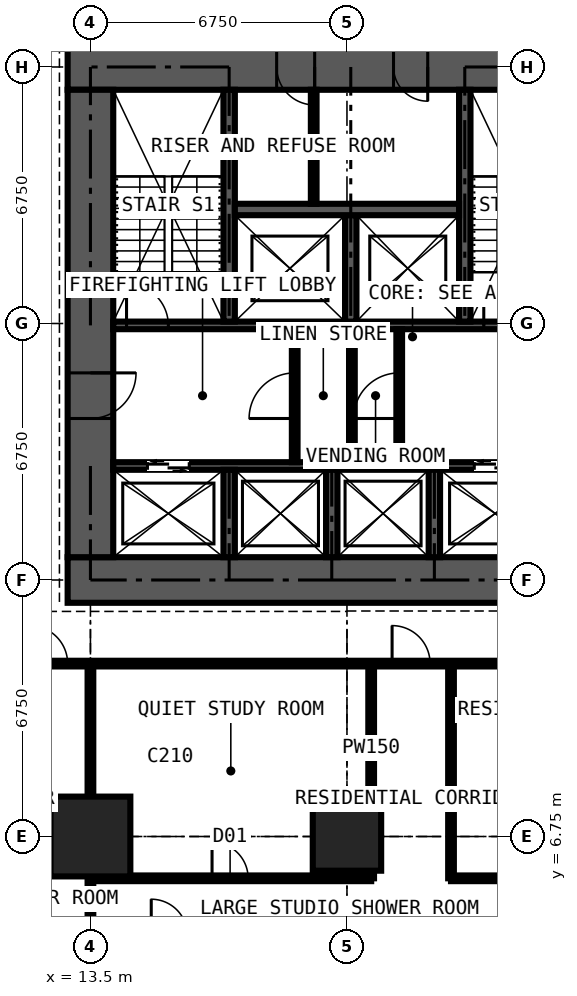
"""IFC4 building model, lengths in metres.
Left out: names, types, materials, properties, quantities, classifications, styles, units other than length and angle.
Written with IfcOpenShell. Run it as: python <this file> out.ifc"""

import sys

from ifc_helpers import new_model, si_unit, direction, frame, frame_2d, origin, origin_2d, place, context, subcontext, project, spatial, rectangle, extrude, element, fill, save


model = new_model("IFC4")
c1 = context("Model", 3, precision=1e-05, world=origin(), true_north=direction((0.0, 1.0)))
c2 = subcontext(c1, "Body", "Model", "MODEL_VIEW")
j1 = project(units=[si_unit("LENGTHUNIT", "METRE"), si_unit("PLANEANGLEUNIT", "RADIAN")], contexts=[c1])
p1 = place(None, origin())
s1 = spatial("IfcSite", under=j1, at=p1, CompositionType="ELEMENT")
p2 = place(p1, origin())
s2 = spatial("IfcBuilding", under=s1, at=p2, CompositionType="ELEMENT")
p3 = place(p2, frame((0.0, 0.0, 72.0)))
s3 = spatial("IfcBuildingStorey", under=s2, at=p3, CompositionType="ELEMENT", Elevation=72.0)
p4 = place(p3, frame((13.5, 6.75, 0.0), z_axis=(0.0, 0.0, 1.0), x_axis=(1.0, 0.0, 0.0)))
e1 = element("IfcColumn", 1, at=p4, inside=s3, PredefinedType="COLUMN", context=c2, shape_type="SweptSolid", body=[
    extrude(rectangle(XDim=2.1, YDim=2.1, at=origin_2d()), origin(), (0.0, 0.0, 1.0), 3.6),
])
p5 = place(p3, frame((20.25, 6.75, 0.0), z_axis=(0.0, 0.0, 1.0), x_axis=(1.0, 0.0, 0.0)))
e2 = element("IfcColumn", 2, at=p5, inside=s3, PredefinedType="COLUMN", context=c2, shape_type="SweptSolid", body=[
    extrude(rectangle(XDim=1.8, YDim=1.8, at=origin_2d()), origin(), (0.0, 0.0, 1.0), 3.6),
])
p6 = place(p3, frame((12.9, 13.5, 0.0), z_axis=(0.0, 0.0, 1.0), x_axis=(1.0, 0.0, 0.0)))
e3 = element("IfcWall", 3, at=p6, inside=s3, PredefinedType="SHEAR", context=c2, shape_type="SweptSolid", body=[
    extrude(rectangle(XDim=14.7, YDim=1.2, at=frame_2d((7.35, 0.0))), origin(), (0.0, 0.0, 1.0), 3.6),
])
p7 = place(p3, frame((27.6, 27.0, 0.0), z_axis=(0.0, 0.0, 1.0), x_axis=(-1.0, 0.0, 0.0)))
e4 = element("IfcWall", 4, at=p7, inside=s3, PredefinedType="SHEAR", context=c2, shape_type="SweptSolid", body=[
    extrude(rectangle(XDim=14.7, YDim=1.2, at=frame_2d((7.35, 0.0))), origin(), (0.0, 0.0, 1.0), 3.6),
])
p8 = place(p7, frame((5.225, 0.0, 0.0)))
e5 = element("IfcOpeningElement", 5, at=p8, cuts=e4, PredefinedType="OPENING", context=c2, shape_type="SweptSolid", body=[
    extrude(rectangle(XDim=0.9, YDim=2.2, at=frame_2d((0.45, 1.1))), frame((0.0, 0.61, 0.0), z_axis=(0.0, -1.0, 0.0), x_axis=(1.0, 0.0, 0.0)), (0.0, 0.0, 1.0), 1.22),
])
p9 = place(p7, frame((8.2, 0.0, 0.0)))
e6 = element("IfcOpeningElement", 6, at=p9, cuts=e4, PredefinedType="OPENING", context=c2, shape_type="SweptSolid", body=[
    extrude(rectangle(XDim=1.0, YDim=2.2, at=frame_2d((0.5, 1.1))), frame((0.0, 0.61, 0.0), z_axis=(0.0, -1.0, 0.0), x_axis=(1.0, 0.0, 0.0)), (0.0, 0.0, 1.0), 1.22),
])
p10 = place(p3, frame((13.5, 26.4, 0.0), z_axis=(0.0, 0.0, 1.0), x_axis=(0.0, -1.0, 0.0)))
e7 = element("IfcWall", 7, at=p10, inside=s3, PredefinedType="SHEAR", context=c2, shape_type="SweptSolid", body=[
    extrude(rectangle(XDim=12.3, YDim=1.2, at=frame_2d((6.15, 0.0))), origin(), (0.0, 0.0, 1.0), 3.6),
])
p11 = place(p10, frame((7.45, 0.0, 0.0)))
e8 = element("IfcOpeningElement", 8, at=p11, cuts=e7, PredefinedType="OPENING", context=c2, shape_type="SweptSolid", body=[
    extrude(rectangle(XDim=1.2, YDim=2.2, at=frame_2d((0.6, 1.1))), frame((0.0, 0.61, 0.0), z_axis=(0.0, -1.0, 0.0), x_axis=(1.0, 0.0, 0.0)), (0.0, 0.0, 1.0), 1.22),
])
p12 = place(p3, frame((14.1, 16.5, 0.0), z_axis=(0.0, 0.0, 1.0), x_axis=(1.0, 0.0, 0.0)))
e9 = element("IfcWall", 9, at=p12, inside=s3, PredefinedType="SHEAR", context=c2, shape_type="SweptSolid", body=[
    extrude(rectangle(XDim=12.3, YDim=0.2, at=frame_2d((6.15, 0.0))), origin(), (0.0, 0.0, 1.0), 3.6),
])
p13 = place(p12, frame((0.9, 0.0, 0.0)))
e10 = element("IfcOpeningElement", 10, at=p13, cuts=e9, PredefinedType="OPENING", context=c2, shape_type="SweptSolid", body=[
    extrude(rectangle(XDim=1.1, YDim=2.2, at=frame_2d((0.55, 1.1))), frame((0.0, 0.11, 0.0), z_axis=(0.0, -1.0, 0.0), x_axis=(1.0, 0.0, 0.0)), (0.0, 0.0, 1.0), 0.22),
])
p14 = place(p12, frame((9.5, 0.0, 0.0)))
e11 = element("IfcOpeningElement", 11, at=p14, cuts=e9, PredefinedType="OPENING", context=c2, shape_type="SweptSolid", body=[
    extrude(rectangle(XDim=1.1, YDim=2.2, at=frame_2d((0.55, 1.1))), frame((0.0, 0.11, 0.0), z_axis=(0.0, -1.0, 0.0), x_axis=(1.0, 0.0, 0.0)), (0.0, 0.0, 1.0), 0.22),
])
p15 = place(p3, frame((14.1, 20.2, 0.0), z_axis=(0.0, 0.0, 1.0), x_axis=(1.0, 0.0, 0.0)))
e12 = element("IfcWall", 12, at=p15, inside=s3, PredefinedType="SHEAR", context=c2, shape_type="SweptSolid", body=[
    extrude(rectangle(XDim=12.3, YDim=0.2, at=frame_2d((6.15, 0.0))), origin(), (0.0, 0.0, 1.0), 3.6),
])
p16 = place(p15, frame((0.35, 0.0, 0.0)))
e13 = element("IfcOpeningElement", 13, at=p16, cuts=e12, PredefinedType="OPENING", context=c2, shape_type="SweptSolid", body=[
    extrude(rectangle(XDim=1.1, YDim=2.2, at=frame_2d((0.55, 1.1))), frame((0.0, 0.11, 0.0), z_axis=(0.0, -1.0, 0.0), x_axis=(1.0, 0.0, 0.0)), (0.0, 0.0, 1.0), 0.22),
])
p17 = place(p15, frame((9.75, 0.0, 0.0)))
e14 = element("IfcOpeningElement", 14, at=p17, cuts=e12, PredefinedType="OPENING", context=c2, shape_type="SweptSolid", body=[
    extrude(rectangle(XDim=1.1, YDim=2.2, at=frame_2d((0.55, 1.1))), frame((0.0, 0.11, 0.0), z_axis=(0.0, -1.0, 0.0), x_axis=(1.0, 0.0, 0.0)), (0.0, 0.0, 1.0), 0.22),
])
for number, where, z_axis, x_axis in (
    (15, (17.15, 20.3, 0.0), (0.0, 0.0, 1.0), (0.0, 1.0, 0.0)),
    (16, (23.35, 20.3, 0.0), (0.0, 0.0, 1.0), (0.0, 1.0, 0.0)),
):
    element("IfcWall", number, at=place(p3, frame(where, z_axis=z_axis, x_axis=x_axis)), inside=s3, PredefinedType="SHEAR", context=c2, shape_type="SweptSolid", body=[
        extrude(rectangle(XDim=6.1, YDim=0.3, at=frame_2d((3.05, 0.0))), origin(), (0.0, 0.0, 1.0), 3.6),
    ])
p18 = place(p3, frame((20.35, 20.3, 0.0), z_axis=(0.0, 0.0, 1.0), x_axis=(0.0, 1.0, 0.0)))
e17 = element("IfcWall", 17, at=p18, inside=s3, PredefinedType="SHEAR", context=c2, shape_type="SweptSolid", body=[
    extrude(rectangle(XDim=2.8, YDim=0.3, at=frame_2d((1.4, 0.0))), origin(), (0.0, 0.0, 1.0), 3.6),
])
p19 = place(p3, frame((17.3, 23.25, 0.0), z_axis=(0.0, 0.0, 1.0), x_axis=(1.0, 0.0, 0.0)))
e18 = element("IfcWall", 18, at=p19, inside=s3, PredefinedType="SHEAR", context=c2, shape_type="SweptSolid", body=[
    extrude(rectangle(XDim=5.9, YDim=0.3, at=frame_2d((2.95, 0.0))), origin(), (0.0, 0.0, 1.0), 3.6),
])
for number, where, z_axis, x_axis in (
    (19, (17.15, 14.1, 0.0), (0.0, 0.0, 1.0), (0.0, 1.0, 0.0)),
    (20, (19.85, 14.1, 0.0), (0.0, 0.0, 1.0), (0.0, 1.0, 0.0)),
    (21, (22.55, 14.1, 0.0), (0.0, 0.0, 1.0), (0.0, 1.0, 0.0)),
):
    element("IfcWall", number, at=place(p3, frame(where, z_axis=z_axis, x_axis=x_axis)), inside=s3, PredefinedType="SHEAR", context=c2, shape_type="SweptSolid", body=[
        extrude(rectangle(XDim=2.3, YDim=0.3, at=frame_2d((1.15, 0.0))), origin(), (0.0, 0.0, 1.0), 3.6),
    ])
p20 = place(p3, frame((18.875, 16.6, 0.0), z_axis=(0.0, 0.0, 1.0), x_axis=(0.0, 1.0, 0.0)))
e22 = element("IfcWall", 22, at=p20, inside=s3, PredefinedType="PARTITIONING", context=c2, shape_type="SweptSolid", body=[
    extrude(rectangle(XDim=3.5, YDim=0.15, at=frame_2d((1.75, 0.0))), origin(), (0.0, 0.0, 1.0), 3.3),
])
p21 = place(p20, frame((1.15, 0.0, 0.0)))
e23 = element("IfcOpeningElement", 23, at=p21, cuts=e22, PredefinedType="OPENING", context=c2, shape_type="SweptSolid", body=[
    extrude(rectangle(XDim=1.2, YDim=2.2, at=frame_2d((0.6, 1.1))), frame((0.0, 0.085, 0.0), z_axis=(0.0, -1.0, 0.0), x_axis=(1.0, 0.0, 0.0)), (0.0, 0.0, 1.0), 0.17),
])
p22 = place(p3, frame((21.625, 16.6, 0.0), z_axis=(0.0, 0.0, 1.0), x_axis=(0.0, 1.0, 0.0)))
e24 = element("IfcWall", 24, at=p22, inside=s3, PredefinedType="PARTITIONING", context=c2, shape_type="SweptSolid", body=[
    extrude(rectangle(XDim=3.5, YDim=0.15, at=frame_2d((1.75, 0.0))), origin(), (0.0, 0.0, 1.0), 3.3),
])
p23 = place(p22, frame((1.15, 0.0, 0.0)))
e25 = element("IfcOpeningElement", 25, at=p23, cuts=e24, PredefinedType="OPENING", context=c2, shape_type="SweptSolid", body=[
    extrude(rectangle(XDim=1.2, YDim=2.2, at=frame_2d((0.6, 1.1))), frame((0.0, 0.085, 0.0), z_axis=(0.0, -1.0, 0.0), x_axis=(1.0, 0.0, 0.0)), (0.0, 0.0, 1.0), 0.17),
])
p24 = place(p3, frame((20.38, 16.6, 0.0), z_axis=(0.0, 0.0, 1.0), x_axis=(0.0, 1.0, 0.0)))
e26 = element("IfcWall", 26, at=p24, inside=s3, PredefinedType="PARTITIONING", context=c2, shape_type="SweptSolid", body=[
    extrude(rectangle(XDim=3.5, YDim=0.15, at=frame_2d((1.75, 0.0))), origin(), (0.0, 0.0, 1.0), 3.3),
])
p25 = place(p3, frame((19.375, 23.4, 0.0), z_axis=(0.0, 0.0, 1.0), x_axis=(0.0, 1.0, 0.0)))
e27 = element("IfcWall", 27, at=p25, inside=s3, PredefinedType="PARTITIONING", context=c2, shape_type="SweptSolid", body=[
    extrude(rectangle(XDim=3.0, YDim=0.15, at=frame_2d((1.5, 0.0))), origin(), (0.0, 0.0, 1.0), 3.3),
])
p26 = place(p3, frame((10.125, 11.3, 0.0), z_axis=(0.0, 0.0, 1.0), x_axis=(1.0, 0.0, 0.0)))
e28 = element("IfcWall", 28, at=p26, inside=s3, PredefinedType="PARTITIONING", context=c2, shape_type="SweptSolid", body=[
    extrude(rectangle(XDim=20.675, YDim=0.15, at=frame_2d((10.337, 0.0))), origin(), (0.0, 0.0, 1.0), 3.3),
])
p27 = place(p26, frame((1.775, 0.0, 0.0)))
e29 = element("IfcOpeningElement", 29, at=p27, cuts=e28, PredefinedType="OPENING", context=c2, shape_type="SweptSolid", body=[
    extrude(rectangle(XDim=1.0, YDim=2.2, at=frame_2d((0.5, 1.1))), frame((0.0, 0.085, 0.0), z_axis=(0.0, -1.0, 0.0), x_axis=(1.0, 0.0, 0.0)), (0.0, 0.0, 1.0), 0.17),
])
p28 = place(p26, frame((11.312, 0.0, 0.0)))
e30 = element("IfcOpeningElement", 30, at=p28, cuts=e28, PredefinedType="OPENING", context=c2, shape_type="SweptSolid", body=[
    extrude(rectangle(XDim=1.0, YDim=2.2, at=frame_2d((0.5, 1.1))), frame((0.0, 0.085, 0.0), z_axis=(0.0, -1.0, 0.0), x_axis=(1.0, 0.0, 0.0)), (0.0, 0.0, 1.0), 0.17),
])
p29 = place(p3, frame((13.5, -0.734, 0.0), z_axis=(0.0, 0.0, 1.0), x_axis=(0.0, 1.0, 0.0)))
e31 = element("IfcWall", 31, at=p29, inside=s3, PredefinedType="PARTITIONING", context=c2, shape_type="SweptSolid", body=[
    extrude(rectangle(XDim=12.034, YDim=0.15, at=frame_2d((6.017, 0.0))), origin(), (0.0, 0.0, 1.0), 2.802),
])
p30 = place(p3, frame((13.5, 5.65, 0.0), z_axis=(0.0, 0.0, 1.0), x_axis=(1.0, 0.0, 0.0)))
e32 = element("IfcWall", 32, at=p30, inside=s3, PredefinedType="PARTITIONING", context=c2, shape_type="SweptSolid", body=[
    extrude(rectangle(XDim=7.387, YDim=0.15, at=frame_2d((3.694, 0.0))), origin(), (0.0, 0.0, 1.0), 3.3),
])
p31 = place(p30, frame((3.2, 0.0, 0.0)))
e33 = element("IfcOpeningElement", 33, at=p31, cuts=e32, PredefinedType="OPENING", context=c2, shape_type="SweptSolid", body=[
    extrude(rectangle(XDim=0.95, YDim=2.2, at=frame_2d((0.475, 1.1))), frame((0.0, 0.085, 0.0), z_axis=(0.0, -1.0, 0.0), x_axis=(1.0, 0.0, 0.0)), (0.0, 0.0, 1.0), 0.17),
])
p32 = place(p3, frame((20.887, 5.65, 0.0), z_axis=(0.0, 0.0, 1.0), x_axis=(0.0, 1.0, 0.0)))
e34 = element("IfcWall", 34, at=p32, inside=s3, PredefinedType="PARTITIONING", context=c2, shape_type="SweptSolid", body=[
    extrude(rectangle(XDim=5.65, YDim=0.15, at=frame_2d((2.825, 0.0))), origin(), (0.0, 0.0, 1.0), 3.3),
])
p33 = place(p3, frame((22.988, 5.65, 0.0), z_axis=(0.0, 0.0, 1.0), x_axis=(1.0, 0.0, 0.0)))
e35 = element("IfcWall", 35, at=p33, inside=s3, PredefinedType="PARTITIONING", context=c2, shape_type="SweptSolid", body=[
    extrude(rectangle(XDim=7.387, YDim=0.15, at=frame_2d((3.694, 0.0))), origin(), (0.0, 0.0, 1.0), 3.3),
])
p34 = place(p33, frame((2.0, 0.0, 0.0)))
e36 = element("IfcOpeningElement", 36, at=p34, cuts=e35, PredefinedType="OPENING", context=c2, shape_type="SweptSolid", body=[
    extrude(rectangle(XDim=0.95, YDim=2.2, at=frame_2d((0.475, 1.1))), frame((0.0, 0.085, 0.0), z_axis=(0.0, -1.0, 0.0), x_axis=(1.0, 0.0, 0.0)), (0.0, 0.0, 1.0), 0.17),
])
p35 = place(p3, frame((22.988, 5.65, 0.0), z_axis=(0.0, 0.0, 1.0), x_axis=(0.0, 1.0, 0.0)))
e37 = element("IfcWall", 37, at=p35, inside=s3, PredefinedType="PARTITIONING", context=c2, shape_type="SweptSolid", body=[
    extrude(rectangle(XDim=5.65, YDim=0.15, at=frame_2d((2.825, 0.0))), origin(), (0.0, 0.0, 1.0), 3.3),
])
p36 = place(p13, origin())
e38 = element("IfcDoor", 38, at=p36, inside=s3, OperationType="DOUBLE_DOOR_SLIDING", PredefinedType="DOOR", context=c2, shape_type="SweptSolid", body=[
    extrude(rectangle(XDim=1.1, YDim=2.2, at=frame_2d((0.55, 1.1))), frame((0.0, 0.025, 0.0), z_axis=(0.0, -1.0, 0.0), x_axis=(1.0, 0.0, 0.0)), (0.0, 0.0, 1.0), 0.05),
])
fill(e10, e38)
p37 = place(p14, origin())
e39 = element("IfcDoor", 39, at=p37, inside=s3, OperationType="DOUBLE_DOOR_SLIDING", PredefinedType="DOOR", context=c2, shape_type="SweptSolid", body=[
    extrude(rectangle(XDim=1.1, YDim=2.2, at=frame_2d((0.55, 1.1))), frame((0.0, 0.025, 0.0), z_axis=(0.0, -1.0, 0.0), x_axis=(1.0, 0.0, 0.0)), (0.0, 0.0, 1.0), 0.05),
])
fill(e11, e39)
p38 = place(p11, origin())
e40 = element("IfcDoor", 40, at=p38, inside=s3, OperationType="DOUBLE_DOOR_SINGLE_SWING", PredefinedType="DOOR", context=c2, shape_type="SweptSolid", body=[
    extrude(rectangle(XDim=1.2, YDim=2.2, at=frame_2d((0.6, 1.1))), frame((0.0, 0.025, 0.0), z_axis=(0.0, -1.0, 0.0), x_axis=(1.0, 0.0, 0.0)), (0.0, 0.0, 1.0), 0.05),
])
fill(e8, e40)
p39 = place(p21, origin())
e41 = element("IfcDoor", 41, at=p39, inside=s3, OperationType="DOUBLE_DOOR_SINGLE_SWING", PredefinedType="DOOR", context=c2, shape_type="SweptSolid", body=[
    extrude(rectangle(XDim=1.2, YDim=2.2, at=frame_2d((0.6, 1.1))), frame((0.0, 0.025, 0.0), z_axis=(0.0, -1.0, 0.0), x_axis=(1.0, 0.0, 0.0)), (0.0, 0.0, 1.0), 0.05),
])
fill(e23, e41)
p40 = place(p23, origin())
e42 = element("IfcDoor", 42, at=p40, inside=s3, OperationType="DOUBLE_DOOR_SINGLE_SWING", PredefinedType="DOOR", context=c2, shape_type="SweptSolid", body=[
    extrude(rectangle(XDim=1.2, YDim=2.2, at=frame_2d((0.6, 1.1))), frame((0.0, 0.025, 0.0), z_axis=(0.0, -1.0, 0.0), x_axis=(1.0, 0.0, 0.0)), (0.0, 0.0, 1.0), 0.05),
])
fill(e25, e42)
p41 = place(p8, origin())
e43 = element("IfcDoor", 43, at=p41, inside=s3, OperationType="SINGLE_SWING_LEFT", PredefinedType="DOOR", context=c2, shape_type="SweptSolid", body=[
    extrude(rectangle(XDim=0.9, YDim=2.2, at=frame_2d((0.45, 1.1))), frame((0.0, 0.4, 0.0), z_axis=(0.0, -1.0, 0.0), x_axis=(1.0, 0.0, 0.0)), (0.0, 0.0, 1.0), 0.8),
])
fill(e5, e43)
p42 = place(p9, origin())
e44 = element("IfcDoor", 44, at=p42, inside=s3, OperationType="SINGLE_SWING_LEFT", PredefinedType="DOOR", context=c2, shape_type="SweptSolid", body=[
    extrude(rectangle(XDim=1.0, YDim=2.2, at=frame_2d((0.5, 1.1))), frame((0.0, 0.025, 0.0), z_axis=(0.0, -1.0, 0.0), x_axis=(1.0, 0.0, 0.0)), (0.0, 0.0, 1.0), 0.05),
])
fill(e6, e44)
p43 = place(p16, origin())
e45 = element("IfcDoor", 45, at=p43, inside=s3, OperationType="SINGLE_SWING_LEFT", PredefinedType="DOOR", context=c2, shape_type="SweptSolid", body=[
    extrude(rectangle(XDim=1.1, YDim=2.2, at=frame_2d((0.55, 1.1))), frame((0.0, 0.025, 0.0), z_axis=(0.0, -1.0, 0.0), x_axis=(1.0, 0.0, 0.0)), (0.0, 0.0, 1.0), 0.05),
])
fill(e13, e45)
p44 = place(p17, origin())
e46 = element("IfcDoor", 46, at=p44, inside=s3, OperationType="SINGLE_SWING_LEFT", PredefinedType="DOOR", context=c2, shape_type="SweptSolid", body=[
    extrude(rectangle(XDim=1.1, YDim=2.2, at=frame_2d((0.55, 1.1))), frame((0.0, 0.025, 0.0), z_axis=(0.0, -1.0, 0.0), x_axis=(1.0, 0.0, 0.0)), (0.0, 0.0, 1.0), 0.05),
])
fill(e14, e46)
p45 = place(p27, origin())
e47 = element("IfcDoor", 47, at=p45, inside=s3, OperationType="SINGLE_SWING_LEFT", PredefinedType="DOOR", context=c2, shape_type="SweptSolid", body=[
    extrude(rectangle(XDim=1.0, YDim=2.2, at=frame_2d((0.5, 1.1))), frame((0.0, 0.025, 0.0), z_axis=(0.0, -1.0, 0.0), x_axis=(1.0, 0.0, 0.0)), (0.0, 0.0, 1.0), 0.05),
])
fill(e29, e47)
p46 = place(p28, origin())
e48 = element("IfcDoor", 48, at=p46, inside=s3, OperationType="SINGLE_SWING_LEFT", PredefinedType="DOOR", context=c2, shape_type="SweptSolid", body=[
    extrude(rectangle(XDim=1.0, YDim=2.2, at=frame_2d((0.5, 1.1))), frame((0.0, 0.025, 0.0), z_axis=(0.0, -1.0, 0.0), x_axis=(1.0, 0.0, 0.0)), (0.0, 0.0, 1.0), 0.05),
])
fill(e30, e48)
p47 = place(p31, origin())
e49 = element("IfcDoor", 49, at=p47, inside=s3, OperationType="SINGLE_SWING_LEFT", PredefinedType="DOOR", context=c2, shape_type="SweptSolid", body=[
    extrude(rectangle(XDim=0.95, YDim=2.2, at=frame_2d((0.475, 1.1))), frame((0.0, 0.025, 0.0), z_axis=(0.0, -1.0, 0.0), x_axis=(1.0, 0.0, 0.0)), (0.0, 0.0, 1.0), 0.05),
])
fill(e33, e49)
save(model, sys.argv[1])
